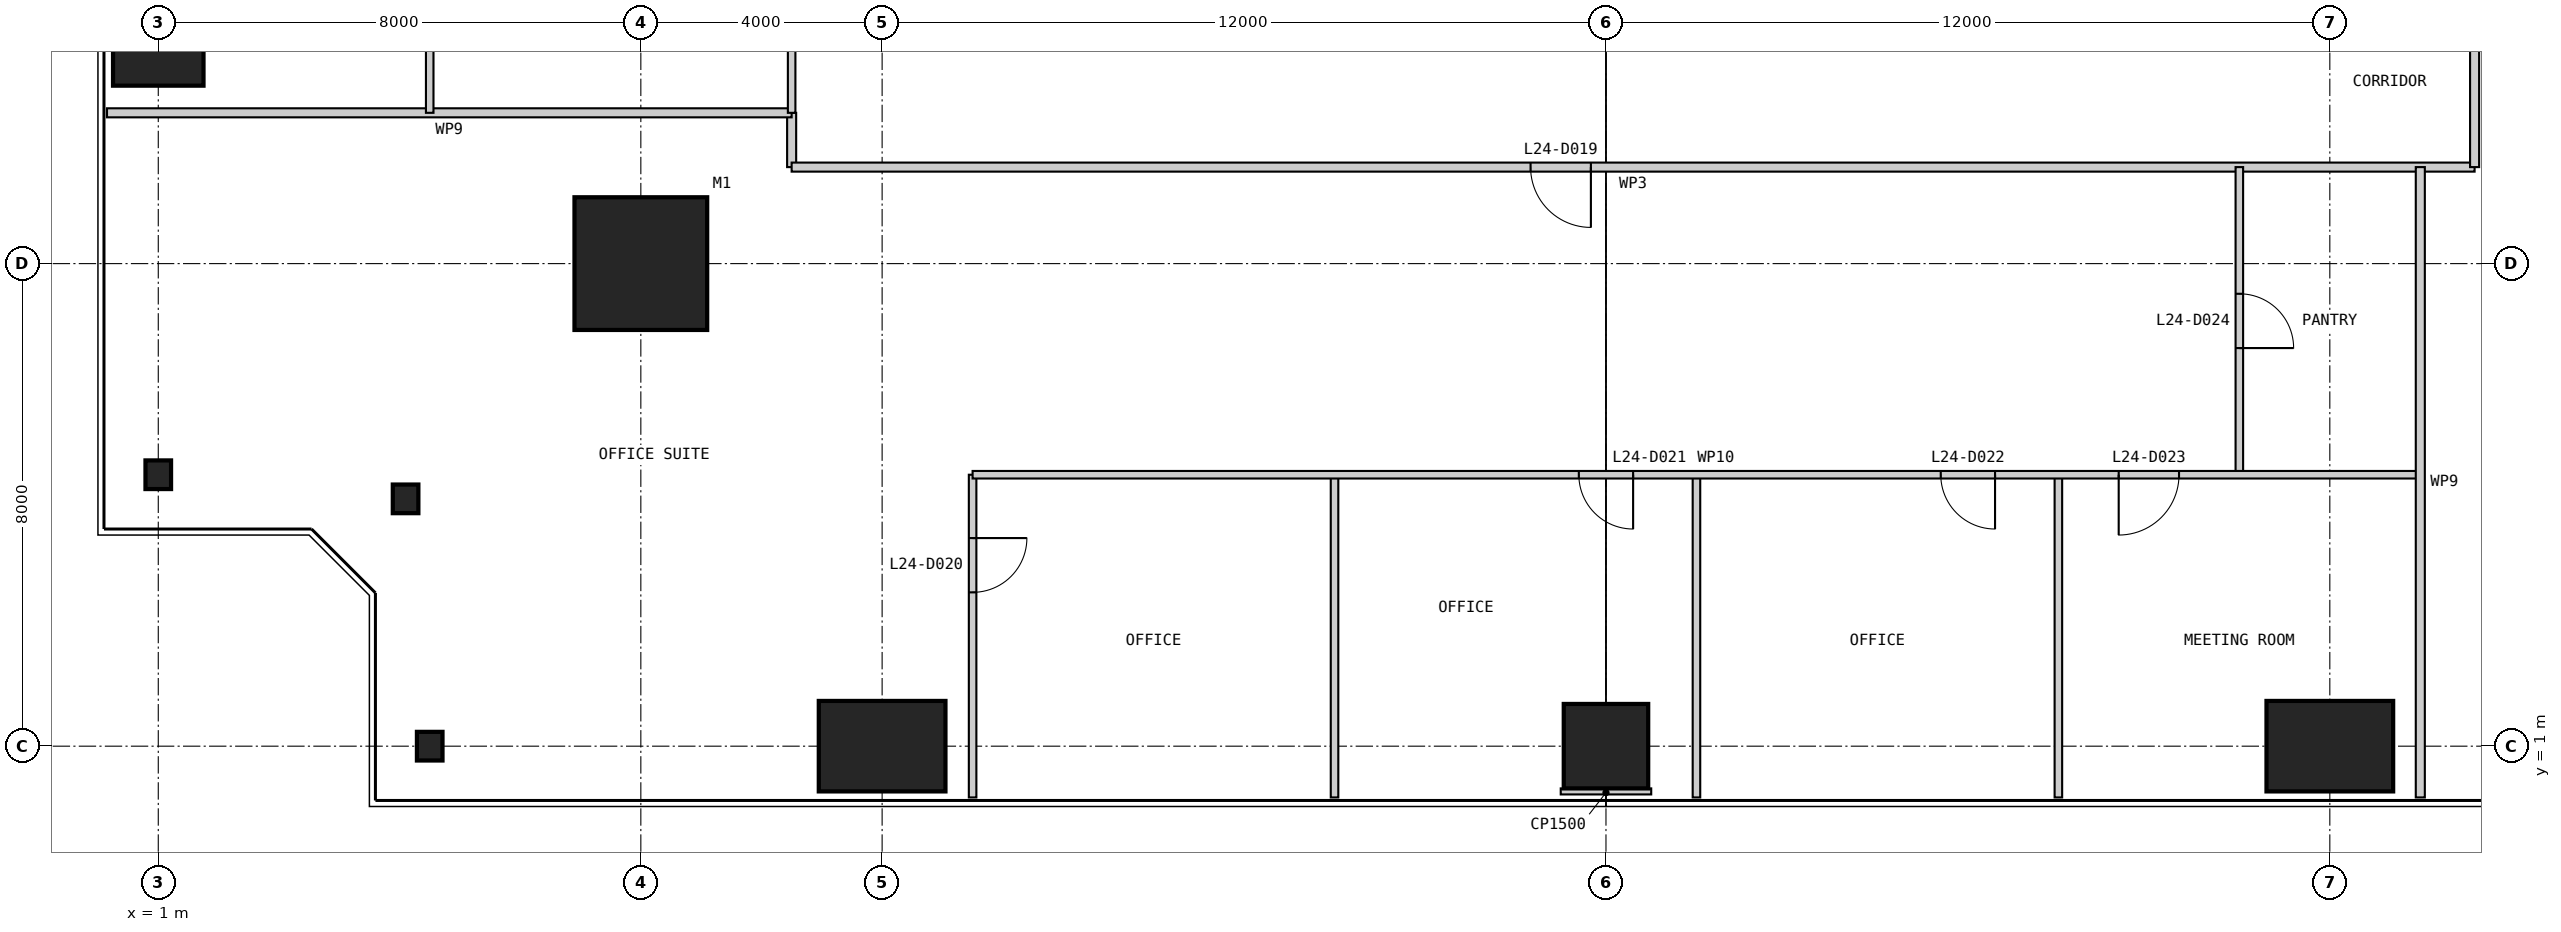
"""IFC4 building model, lengths in metres.
Left out: names, types, materials, properties, quantities, classifications, styles, units other than length and angle.
Written with IfcOpenShell. Run it as: python <this file> out.ifc"""

import sys

from ifc_helpers import new_model, si_unit, direction, frame, frame_2d, origin, origin_2d, place, context, subcontext, project, spatial, rectangle, i_section, extrude, element, fill, save


model = new_model("IFC4")
c1 = context("Model", 3, precision=1e-05, world=origin(), true_north=direction((0.0, 1.0)))
c2 = subcontext(c1, "Body", "Model", "MODEL_VIEW")
j1 = project(units=[si_unit("LENGTHUNIT", "METRE"), si_unit("PLANEANGLEUNIT", "RADIAN")], contexts=[c1])
p1 = place(None, origin())
s1 = spatial("IfcSite", under=j1, at=p1, CompositionType="ELEMENT")
p2 = place(p1, origin())
s2 = spatial("IfcBuilding", under=s1, at=p2, CompositionType="ELEMENT")
p3 = place(p2, frame((0.0, 0.0, 106.4)))
s3 = spatial("IfcBuildingStorey", under=s2, at=p3, CompositionType="ELEMENT", Elevation=106.4)
p4 = place(p3, frame((9.0, 9.0, 0.0), z_axis=(0.0, 0.0, 1.0), x_axis=(1.0, 0.0, 0.0)))
e1 = element("IfcColumn", 1, at=p4, inside=s3, PredefinedType="COLUMN", context=c2, shape_type="SweptSolid", body=[
    extrude(rectangle(XDim=2.2, YDim=2.2, at=origin_2d()), origin(), (0.0, 0.0, 1.0), 4.0),
])
p5 = place(p3, frame((5.5, 1.0, 0.0), z_axis=(0.0, 0.0, 1.0), x_axis=(1.0, 0.0, 0.0)))
e2 = element("IfcColumn", 2, at=p5, inside=s3, PredefinedType="COLUMN", context=c2, shape_type="SweptSolid", body=[
    extrude(i_section(OverallWidth=0.424, OverallDepth=0.475, WebThickness=0.048, FlangeThickness=0.077, at=origin_2d()), origin(), (0.0, 0.0, 1.0), 4.0),
])
p6 = place(p3, frame((13.0, 1.0, 0.0), z_axis=(0.0, 0.0, 1.0), x_axis=(1.0, 0.0, 0.0)))
e3 = element("IfcColumn", 3, at=p6, inside=s3, PredefinedType="COLUMN", context=c2, shape_type="SweptSolid", body=[
    extrude(rectangle(XDim=2.1, YDim=1.5, at=origin_2d()), origin(), (0.0, 0.0, 1.0), 4.0),
])
p7 = place(p3, frame((25.0, 1.0, 0.0), z_axis=(0.0, 0.0, 1.0), x_axis=(1.0, 0.0, 0.0)))
e4 = element("IfcColumn", 4, at=p7, inside=s3, PredefinedType="COLUMN", context=c2, shape_type="SweptSolid", body=[
    extrude(rectangle(XDim=1.4, YDim=1.4, at=origin_2d()), origin(), (0.0, 0.0, 1.0), 4.0),
])
p8 = place(p3, frame((37.0, 1.0, 0.0), z_axis=(0.0, 0.0, 1.0), x_axis=(1.0, 0.0, 0.0)))
e5 = element("IfcColumn", 5, at=p8, inside=s3, PredefinedType="COLUMN", context=c2, shape_type="SweptSolid", body=[
    extrude(rectangle(XDim=2.1, YDim=1.5, at=origin_2d()), origin(), (0.0, 0.0, 1.0), 4.0),
])
p9 = place(p3, frame((1.0, 13.0, 0.0), z_axis=(0.0, 0.0, 1.0), x_axis=(1.0, 0.0, 0.0)))
e6 = element("IfcColumn", 6, at=p9, inside=s3, PredefinedType="COLUMN", context=c2, shape_type="SweptSolid", body=[
    extrude(rectangle(XDim=1.5, YDim=2.1, at=origin_2d()), origin(), (0.0, 0.0, 1.0), 4.0),
])
for number, where, z_axis, x_axis in (
    (7, (1.0, 5.5, 0.0), (0.0, 0.0, 1.0), (1.0, 0.0, 0.0)),
    (8, (5.1, 5.1, 0.0), (0.0, 0.0, 1.0), (1.0, 0.0, 0.0)),
):
    element("IfcColumn", number, at=place(p3, frame(where, z_axis=z_axis, x_axis=x_axis)), inside=s3, PredefinedType="COLUMN", context=c2, shape_type="SweptSolid", body=[
        extrude(i_section(OverallWidth=0.424, OverallDepth=0.475, WebThickness=0.048, FlangeThickness=0.077, at=origin_2d()), origin(), (0.0, 0.0, 1.0), 4.0),
    ])
p10 = place(p3, frame((11.5, 11.5, 0.0), z_axis=(0.0, 0.0, 1.0), x_axis=(0.0, -1.0, 0.0)))
e9 = element("IfcWall", 9, at=p10, inside=s3, PredefinedType="PARTITIONING", context=c2, shape_type="SweptSolid", body=[
    extrude(rectangle(XDim=0.9, YDim=0.15, at=frame_2d((0.45, 0.0))), origin(), (0.0, 0.0, 1.0), 3.85),
])
p11 = place(p3, frame((11.5, 10.6, 0.0), z_axis=(0.0, 0.0, 1.0), x_axis=(1.0, 0.0, 0.0)))
e10 = element("IfcWall", 10, at=p11, inside=s3, PredefinedType="PARTITIONING", context=c2, shape_type="SweptSolid", body=[
    extrude(rectangle(XDim=27.9, YDim=0.15, at=frame_2d((13.95, 0.0))), origin(), (0.0, 0.0, 1.0), 3.85),
])
p12 = place(p11, frame((12.25, 0.0, 0.0)))
e11 = element("IfcOpeningElement", 11, at=p12, cuts=e10, PredefinedType="OPENING", context=c2, shape_type="SweptSolid", body=[
    extrude(rectangle(XDim=1.0, YDim=2.2, at=frame_2d((0.5, 1.1))), frame((0.0, 0.085, 0.0), z_axis=(0.0, -1.0, 0.0), x_axis=(1.0, 0.0, 0.0)), (0.0, 0.0, 1.0), 0.17),
])
p13 = place(p3, frame((0.15, 11.5, 0.0), z_axis=(0.0, 0.0, 1.0), x_axis=(1.0, 0.0, 0.0)))
e12 = element("IfcWall", 12, at=p13, inside=s3, PredefinedType="PARTITIONING", context=c2, shape_type="SweptSolid", body=[
    extrude(rectangle(XDim=11.35, YDim=0.15, at=frame_2d((5.675, 0.0))), origin(), (0.0, 0.0, 1.0), 3.85),
])
p14 = place(p3, frame((14.5, 0.15, 0.0), z_axis=(0.0, 0.0, 1.0), x_axis=(0.0, 1.0, 0.0)))
e13 = element("IfcWall", 13, at=p14, inside=s3, PredefinedType="PARTITIONING", context=c2, shape_type="SweptSolid", body=[
    extrude(rectangle(XDim=5.35, YDim=0.125, at=frame_2d((2.675, 0.0))), origin(), (0.0, 0.0, 1.0), 3.85),
])
p15 = place(p14, frame((3.4, 0.0, 0.0)))
e14 = element("IfcOpeningElement", 14, at=p15, cuts=e13, PredefinedType="OPENING", context=c2, shape_type="SweptSolid", body=[
    extrude(rectangle(XDim=0.9, YDim=2.2, at=frame_2d((0.45, 1.1))), frame((0.0, 0.073, 0.0), z_axis=(0.0, -1.0, 0.0), x_axis=(1.0, 0.0, 0.0)), (0.0, 0.0, 1.0), 0.145),
])
for number, where, z_axis, x_axis in (
    (15, (20.5, 0.15, 0.0), (0.0, 0.0, 1.0), (0.0, 1.0, 0.0)),
    (16, (26.5, 0.15, 0.0), (0.0, 0.0, 1.0), (0.0, 1.0, 0.0)),
    (17, (32.5, 0.15, 0.0), (0.0, 0.0, 1.0), (0.0, 1.0, 0.0)),
):
    element("IfcWall", number, at=place(p3, frame(where, z_axis=z_axis, x_axis=x_axis)), inside=s3, PredefinedType="PARTITIONING", context=c2, shape_type="SweptSolid", body=[
        extrude(rectangle(XDim=5.35, YDim=0.125, at=frame_2d((2.675, 0.0))), origin(), (0.0, 0.0, 1.0), 3.85),
    ])
p16 = place(p3, frame((35.5, 5.5, 0.0), z_axis=(0.0, 0.0, 1.0), x_axis=(0.0, 1.0, 0.0)))
e18 = element("IfcWall", 18, at=p16, inside=s3, PredefinedType="PARTITIONING", context=c2, shape_type="SweptSolid", body=[
    extrude(rectangle(XDim=5.1, YDim=0.125, at=frame_2d((2.55, 0.0))), origin(), (0.0, 0.0, 1.0), 3.85),
])
p17 = place(p16, frame((2.1, 0.0, 0.0)))
e19 = element("IfcOpeningElement", 19, at=p17, cuts=e18, PredefinedType="OPENING", context=c2, shape_type="SweptSolid", body=[
    extrude(rectangle(XDim=0.9, YDim=2.2, at=frame_2d((0.45, 1.1))), frame((0.0, 0.073, 0.0), z_axis=(0.0, -1.0, 0.0), x_axis=(1.0, 0.0, 0.0)), (0.0, 0.0, 1.0), 0.145),
])
p18 = place(p3, frame((14.5, 5.5, 0.0), z_axis=(0.0, 0.0, 1.0), x_axis=(1.0, 0.0, 0.0)))
e20 = element("IfcWall", 20, at=p18, inside=s3, PredefinedType="PARTITIONING", context=c2, shape_type="SweptSolid", body=[
    extrude(rectangle(XDim=24.0, YDim=0.125, at=frame_2d((12.0, 0.0))), origin(), (0.0, 0.0, 1.0), 3.85),
])
p19 = place(p18, frame((10.05, 0.0, 0.0)))
e21 = element("IfcOpeningElement", 21, at=p19, cuts=e20, PredefinedType="OPENING", context=c2, shape_type="SweptSolid", body=[
    extrude(rectangle(XDim=0.9, YDim=2.2, at=frame_2d((0.45, 1.1))), frame((0.0, 0.073, 0.0), z_axis=(0.0, -1.0, 0.0), x_axis=(1.0, 0.0, 0.0)), (0.0, 0.0, 1.0), 0.145),
])
p20 = place(p18, frame((16.05, 0.0, 0.0)))
e22 = element("IfcOpeningElement", 22, at=p20, cuts=e20, PredefinedType="OPENING", context=c2, shape_type="SweptSolid", body=[
    extrude(rectangle(XDim=0.9, YDim=2.2, at=frame_2d((0.45, 1.1))), frame((0.0, 0.073, 0.0), z_axis=(0.0, -1.0, 0.0), x_axis=(1.0, 0.0, 0.0)), (0.0, 0.0, 1.0), 0.145),
])
p21 = place(p18, frame((19.0, 0.0, 0.0)))
e23 = element("IfcOpeningElement", 23, at=p21, cuts=e20, PredefinedType="OPENING", context=c2, shape_type="SweptSolid", body=[
    extrude(rectangle(XDim=1.0, YDim=2.2, at=frame_2d((0.5, 1.1))), frame((0.0, 0.073, 0.0), z_axis=(0.0, -1.0, 0.0), x_axis=(1.0, 0.0, 0.0)), (0.0, 0.0, 1.0), 0.145),
])
p22 = place(p3, frame((39.4, 10.6, 0.0), z_axis=(0.0, 0.0, 1.0), x_axis=(0.0, 1.0, 0.0)))
e24 = element("IfcWall", 24, at=p22, inside=s3, PredefinedType="PARTITIONING", context=c2, shape_type="SweptSolid", body=[
    extrude(rectangle(XDim=28.8, YDim=0.15, at=frame_2d((14.4, 0.0))), origin(), (0.0, 0.0, 1.0), 3.85),
])
p23 = place(p22, frame((12.4, 0.0, 0.0)))
e25 = element("IfcOpeningElement", 25, at=p23, cuts=e24, PredefinedType="OPENING", context=c2, shape_type="SweptSolid", body=[
    extrude(rectangle(XDim=1.0, YDim=2.2, at=frame_2d((0.5, 1.1))), frame((0.0, 0.085, 0.0), z_axis=(0.0, -1.0, 0.0), x_axis=(1.0, 0.0, 0.0)), (0.0, 0.0, 1.0), 0.17),
])
p24 = place(p3, frame((38.5, 0.15, 0.0), z_axis=(0.0, 0.0, 1.0), x_axis=(0.0, 1.0, 0.0)))
e26 = element("IfcWall", 26, at=p24, inside=s3, PredefinedType="PARTITIONING", context=c2, shape_type="SweptSolid", body=[
    extrude(rectangle(XDim=10.45, YDim=0.15, at=frame_2d((5.225, 0.0))), origin(), (0.0, 0.0, 1.0), 3.85),
])
p25 = place(p3, frame((5.5, 17.5, 0.0), z_axis=(0.0, 0.0, 1.0), x_axis=(0.0, -1.0, 0.0)))
e27 = element("IfcWall", 27, at=p25, inside=s3, PredefinedType="PARTITIONING", context=c2, shape_type="SweptSolid", body=[
    extrude(rectangle(XDim=6.0, YDim=0.125, at=frame_2d((3.0, 0.0))), origin(), (0.0, 0.0, 1.0), 3.85),
])
p26 = place(p3, frame((11.5, 14.5, 0.0), z_axis=(0.0, 0.0, 1.0), x_axis=(0.0, -1.0, 0.0)))
e28 = element("IfcWall", 28, at=p26, inside=s3, PredefinedType="PARTITIONING", context=c2, shape_type="SweptSolid", body=[
    extrude(rectangle(XDim=3.0, YDim=0.125, at=frame_2d((1.5, 0.0))), origin(), (0.0, 0.0, 1.0), 3.85),
])
p27 = place(p3, frame((25.0, 0.2, 0.0), z_axis=(0.0, 0.0, 1.0), x_axis=(0.0, 1.0, 0.0)))
e29 = element("IfcWall", 29, at=p27, inside=s3, PredefinedType="PARTITIONING", context=c2, shape_type="SweptSolid", body=[
    extrude(rectangle(XDim=0.1, YDim=1.5, at=frame_2d((0.05, 0.0))), origin(), (0.0, 0.0, 1.0), 3.85),
])
p28 = place(p12, frame((1.0, 0.0, 0.0), z_axis=(0.0, 0.0, 1.0), x_axis=(-1.0, 0.0, 0.0)))
e30 = element("IfcDoor", 30, at=p28, inside=s3, OperationType="SINGLE_SWING_LEFT", PredefinedType="DOOR", context=c2, shape_type="SweptSolid", body=[
    extrude(rectangle(XDim=1.0, YDim=2.2, at=frame_2d((0.5, 1.1))), frame((0.0, 0.025, 0.0), z_axis=(0.0, -1.0, 0.0), x_axis=(1.0, 0.0, 0.0)), (0.0, 0.0, 1.0), 0.05),
])
fill(e11, e30)
p29 = place(p15, frame((0.9, 0.0, 0.0), z_axis=(0.0, 0.0, 1.0), x_axis=(-1.0, 0.0, 0.0)))
e31 = element("IfcDoor", 31, at=p29, inside=s3, OperationType="SINGLE_SWING_LEFT", PredefinedType="DOOR", context=c2, shape_type="SweptSolid", body=[
    extrude(rectangle(XDim=0.9, YDim=2.2, at=frame_2d((0.45, 1.1))), frame((0.0, 0.025, 0.0), z_axis=(0.0, -1.0, 0.0), x_axis=(1.0, 0.0, 0.0)), (0.0, 0.0, 1.0), 0.05),
])
fill(e14, e31)
p30 = place(p19, frame((0.9, 0.0, 0.0), z_axis=(0.0, 0.0, 1.0), x_axis=(-1.0, 0.0, 0.0)))
e32 = element("IfcDoor", 32, at=p30, inside=s3, OperationType="SINGLE_SWING_LEFT", PredefinedType="DOOR", context=c2, shape_type="SweptSolid", body=[
    extrude(rectangle(XDim=0.9, YDim=2.2, at=frame_2d((0.45, 1.1))), frame((0.0, 0.025, 0.0), z_axis=(0.0, -1.0, 0.0), x_axis=(1.0, 0.0, 0.0)), (0.0, 0.0, 1.0), 0.05),
])
fill(e21, e32)
p31 = place(p20, frame((0.9, 0.0, 0.0), z_axis=(0.0, 0.0, 1.0), x_axis=(-1.0, 0.0, 0.0)))
e33 = element("IfcDoor", 33, at=p31, inside=s3, OperationType="SINGLE_SWING_LEFT", PredefinedType="DOOR", context=c2, shape_type="SweptSolid", body=[
    extrude(rectangle(XDim=0.9, YDim=2.2, at=frame_2d((0.45, 1.1))), frame((0.0, 0.025, 0.0), z_axis=(0.0, -1.0, 0.0), x_axis=(1.0, 0.0, 0.0)), (0.0, 0.0, 1.0), 0.05),
])
fill(e22, e33)
p32 = place(p21, frame((1.0, 0.0, 0.0), z_axis=(0.0, 0.0, 1.0), x_axis=(-1.0, 0.0, 0.0)))
e34 = element("IfcDoor", 34, at=p32, inside=s3, OperationType="SINGLE_SWING_RIGHT", PredefinedType="DOOR", context=c2, shape_type="SweptSolid", body=[
    extrude(rectangle(XDim=1.0, YDim=2.2, at=frame_2d((0.5, 1.1))), frame((0.0, 0.025, 0.0), z_axis=(0.0, -1.0, 0.0), x_axis=(1.0, 0.0, 0.0)), (0.0, 0.0, 1.0), 0.05),
])
fill(e23, e34)
p33 = place(p17, frame((0.9, 0.0, 0.0), z_axis=(0.0, 0.0, 1.0), x_axis=(-1.0, 0.0, 0.0)))
e35 = element("IfcDoor", 35, at=p33, inside=s3, OperationType="SINGLE_SWING_RIGHT", PredefinedType="DOOR", context=c2, shape_type="SweptSolid", body=[
    extrude(rectangle(XDim=0.9, YDim=2.2, at=frame_2d((0.45, 1.1))), frame((0.0, 0.025, 0.0), z_axis=(0.0, -1.0, 0.0), x_axis=(1.0, 0.0, 0.0)), (0.0, 0.0, 1.0), 0.05),
])
fill(e19, e35)
save(model, sys.argv[1])
